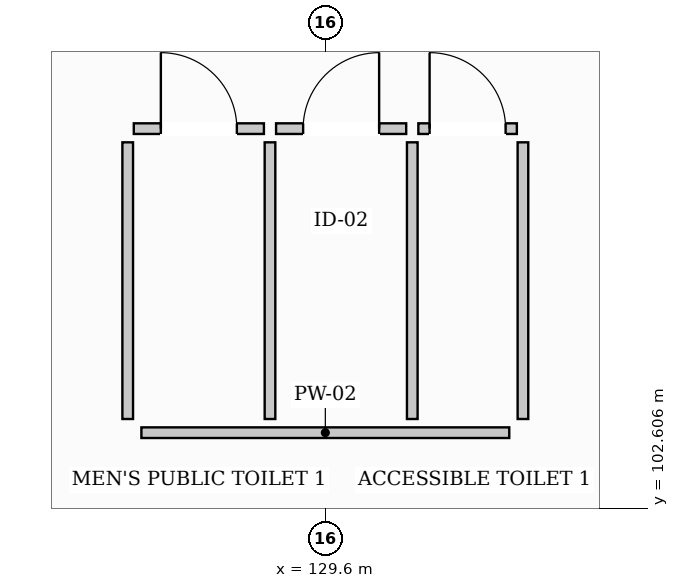
"""IFC4 building model, lengths in metres.
Left out: names, types, materials, properties, quantities, classifications, styles, units other than length and angle.
Written with IfcOpenShell. Run it as: python <this file> out.ifc"""

import sys

from ifc_helpers import new_model, si_unit, direction, frame, frame_2d, origin, place, context, subcontext, project, spatial, rectangle, extrude, element, fill, save


model = new_model("IFC4")
c1 = context("Model", 3, precision=1e-05, world=origin(), true_north=direction((0.0, 1.0)))
c2 = subcontext(c1, "Body", "Model", "MODEL_VIEW")
j1 = project(units=[si_unit("LENGTHUNIT", "METRE"), si_unit("PLANEANGLEUNIT", "RADIAN")], contexts=[c1])
p1 = place(None, origin())
s1 = spatial("IfcSite", under=j1, at=p1, CompositionType="ELEMENT")
p2 = place(p1, origin())
s2 = spatial("IfcBuilding", under=s1, at=p2, CompositionType="ELEMENT")
p3 = place(p2, frame((0.0, 0.0, 13.2)))
s3 = spatial("IfcBuildingStorey", under=s2, at=p3, CompositionType="ELEMENT", Elevation=13.2)
p4 = place(p3, frame((127.18, 103.6, 0.0), z_axis=(0.0, 0.0, 1.0), x_axis=(1.0, 0.0, 0.0)))
e1 = element("IfcWall", 1, at=p4, inside=s3, PredefinedType="PARTITIONING", context=c2, shape_type="SweptSolid", body=[
    extrude(rectangle(XDim=4.84, YDim=0.14, at=frame_2d((2.42, 0.0))), origin(), (0.0, 0.0, 1.0), 2.62),
])
for number, where, z_axis, x_axis in (
    (2, (127.0, 103.78, 0.0), (0.0, 0.0, 1.0), (0.0, 1.0, 0.0)),
    (3, (132.2, 103.78, 0.0), (0.0, 0.0, 1.0), (0.0, 1.0, 0.0)),
    (4, (128.872, 103.78, 0.0), (0.0, 0.0, 1.0), (0.0, 1.0, 0.0)),
    (5, (130.744, 103.78, 0.0), (0.0, 0.0, 1.0), (0.0, 1.0, 0.0)),
):
    element("IfcWall", number, at=place(p3, frame(where, z_axis=z_axis, x_axis=x_axis)), inside=s3, PredefinedType="PARTITIONING", context=c2, shape_type="SweptSolid", body=[
        extrude(rectangle(XDim=3.64, YDim=0.14, at=frame_2d((1.82, 0.0))), origin(), (0.0, 0.0, 1.0), 3.32),
    ])
p5 = place(p3, frame((127.08, 107.6, 0.0), z_axis=(0.0, 0.0, 1.0), x_axis=(1.0, 0.0, 0.0)))
e6 = element("IfcWall", 6, at=p5, inside=s3, PredefinedType="PARTITIONING", context=c2, shape_type="SweptSolid", body=[
    extrude(rectangle(XDim=1.712, YDim=0.14, at=frame_2d((0.856, 0.0))), origin(), (0.0, 0.0, 1.0), 3.32),
])
p6 = place(p5, frame((0.356, 0.0, 0.0)))
e7 = element("IfcOpeningElement", 7, at=p6, cuts=e6, PredefinedType="OPENING", context=c2, shape_type="SweptSolid", body=[
    extrude(rectangle(XDim=1.0, YDim=2.15, at=frame_2d((0.5, 1.075))), frame((0.0, 0.08, 0.0), z_axis=(0.0, -1.0, 0.0), x_axis=(1.0, 0.0, 0.0)), (0.0, 0.0, 1.0), 0.16),
])
p7 = place(p3, frame((128.952, 107.6, 0.0), z_axis=(0.0, 0.0, 1.0), x_axis=(1.0, 0.0, 0.0)))
e8 = element("IfcWall", 8, at=p7, inside=s3, PredefinedType="PARTITIONING", context=c2, shape_type="SweptSolid", body=[
    extrude(rectangle(XDim=1.712, YDim=0.14, at=frame_2d((0.856, 0.0))), origin(), (0.0, 0.0, 1.0), 2.62),
])
p8 = place(p7, frame((0.356, 0.0, 0.0)))
e9 = element("IfcOpeningElement", 9, at=p8, cuts=e8, PredefinedType="OPENING", context=c2, shape_type="SweptSolid", body=[
    extrude(rectangle(XDim=1.0, YDim=2.15, at=frame_2d((0.5, 1.075))), frame((0.0, 0.08, 0.0), z_axis=(0.0, -1.0, 0.0), x_axis=(1.0, 0.0, 0.0)), (0.0, 0.0, 1.0), 0.16),
])
p9 = place(p3, frame((130.824, 107.6, 0.0), z_axis=(0.0, 0.0, 1.0), x_axis=(1.0, 0.0, 0.0)))
e10 = element("IfcWall", 10, at=p9, inside=s3, PredefinedType="PARTITIONING", context=c2, shape_type="SweptSolid", body=[
    extrude(rectangle(XDim=1.296, YDim=0.14, at=frame_2d((0.648, 0.0))), origin(), (0.0, 0.0, 1.0), 3.32),
])
p10 = place(p9, frame((0.148, 0.0, 0.0)))
e11 = element("IfcOpeningElement", 11, at=p10, cuts=e10, PredefinedType="OPENING", context=c2, shape_type="SweptSolid", body=[
    extrude(rectangle(XDim=1.0, YDim=2.15, at=frame_2d((0.5, 1.075))), frame((0.0, 0.08, 0.0), z_axis=(0.0, -1.0, 0.0), x_axis=(1.0, 0.0, 0.0)), (0.0, 0.0, 1.0), 0.16),
])
p11 = place(p6, origin())
e12 = element("IfcDoor", 12, at=p11, inside=s3, OperationType="SINGLE_SWING_LEFT", PredefinedType="DOOR", context=c2, shape_type="SweptSolid", body=[
    extrude(rectangle(XDim=1.0, YDim=2.15, at=frame_2d((0.5, 1.075))), frame((0.0, 0.025, 0.0), z_axis=(0.0, -1.0, 0.0), x_axis=(1.0, 0.0, 0.0)), (0.0, 0.0, 1.0), 0.05),
])
fill(e7, e12)
p12 = place(p8, origin())
e13 = element("IfcDoor", 13, at=p12, inside=s3, OperationType="SINGLE_SWING_RIGHT", PredefinedType="DOOR", context=c2, shape_type="SweptSolid", body=[
    extrude(rectangle(XDim=1.0, YDim=2.15, at=frame_2d((0.5, 1.075))), frame((0.0, 0.025, 0.0), z_axis=(0.0, -1.0, 0.0), x_axis=(1.0, 0.0, 0.0)), (0.0, 0.0, 1.0), 0.05),
])
fill(e9, e13)
p13 = place(p10, origin())
e14 = element("IfcDoor", 14, at=p13, inside=s3, OperationType="SINGLE_SWING_LEFT", PredefinedType="DOOR", context=c2, shape_type="SweptSolid", body=[
    extrude(rectangle(XDim=1.0, YDim=2.15, at=frame_2d((0.5, 1.075))), frame((0.0, 0.025, 0.0), z_axis=(0.0, -1.0, 0.0), x_axis=(1.0, 0.0, 0.0)), (0.0, 0.0, 1.0), 0.05),
])
fill(e11, e14)
save(model, sys.argv[1])
